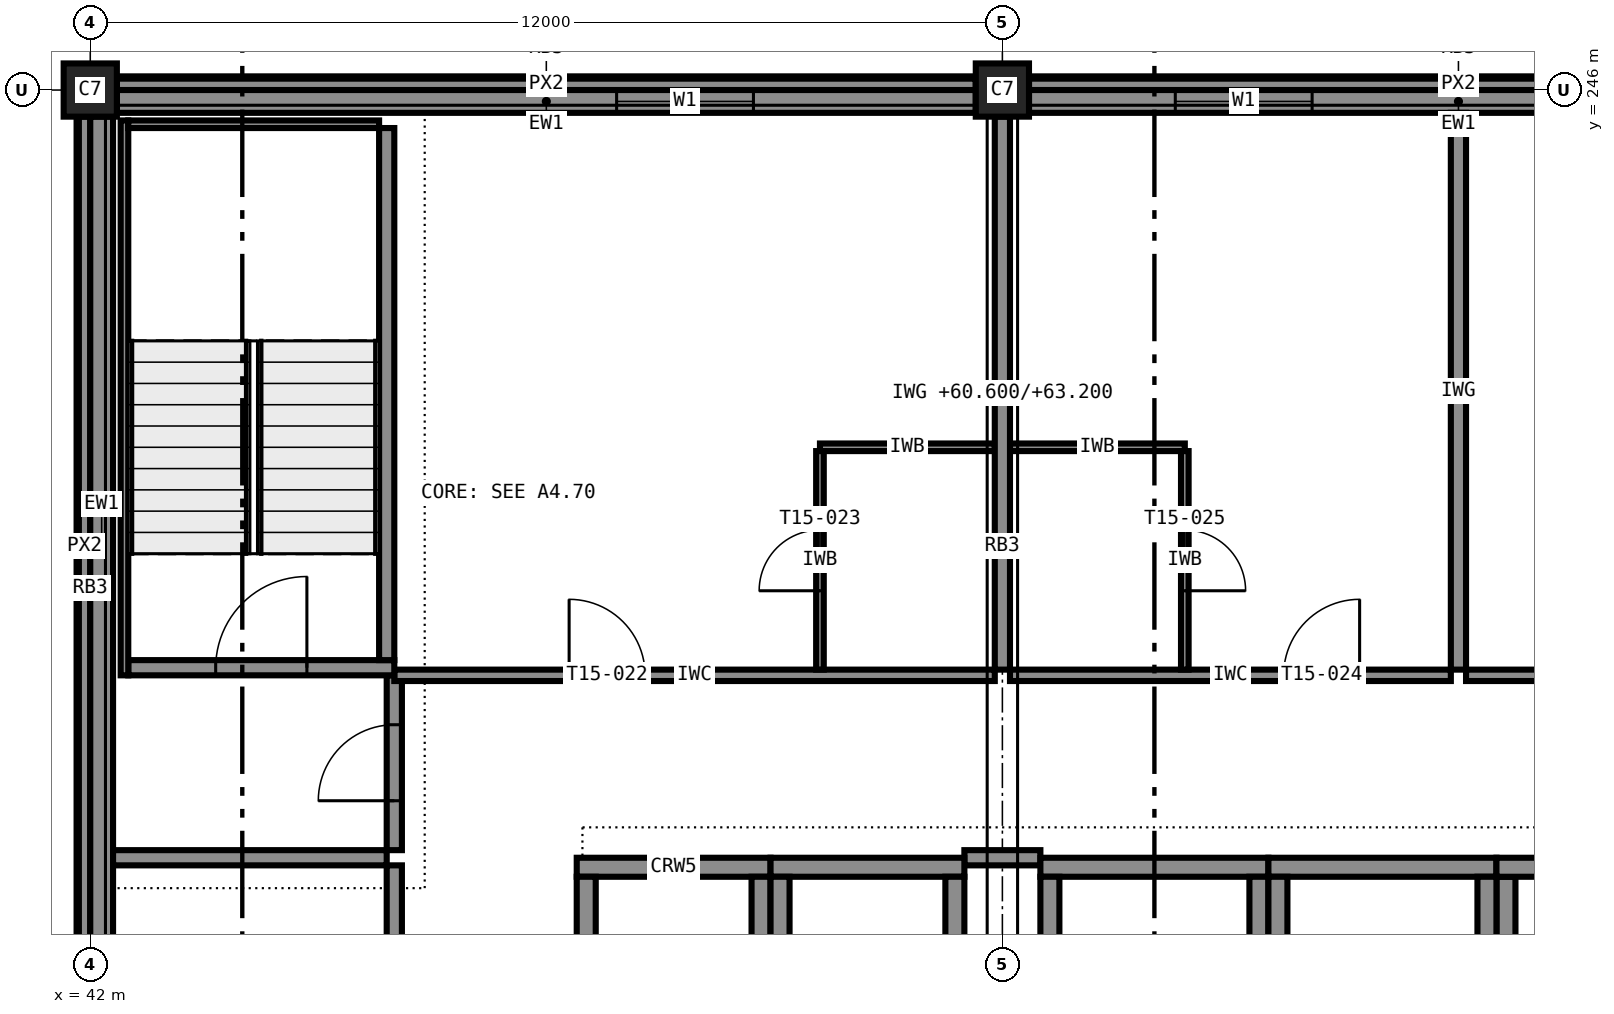
"""IFC4 building model, lengths in metres.
Left out: names, types, materials, properties, quantities, classifications, styles, units other than length and angle.
Written with IfcOpenShell. Run it as: python <this file> out.ifc"""

import sys

from ifc_helpers import new_model, si_unit, direction, frame, frame_2d, origin, origin_2d, place, context, subcontext, project, spatial, rectangle, extrude, element, fill, save


model = new_model("IFC4")
c1 = context("Model", 3, precision=1e-05, world=origin(), true_north=direction((0.0, 1.0)))
c2 = subcontext(c1, "Body", "Model", "MODEL_VIEW")
j1 = project(units=[si_unit("LENGTHUNIT", "METRE"), si_unit("PLANEANGLEUNIT", "RADIAN")], contexts=[c1])
p1 = place(None, origin())
s1 = spatial("IfcSite", under=j1, at=p1, CompositionType="ELEMENT")
p2 = place(p1, origin())
s2 = spatial("IfcBuilding", under=s1, at=p2, CompositionType="ELEMENT")
p3 = place(p2, frame((0.0, 0.0, 60.6)))
s3 = spatial("IfcBuildingStorey", under=s2, at=p3, CompositionType="ELEMENT", Elevation=60.6)
for number, where, z_axis, x_axis in (
    (1, (42.0, 246.0, 0.0), (0.0, 0.0, 1.0), (1.0, 0.0, 0.0)),
    (2, (54.0, 246.0, 0.0), (0.0, 0.0, 1.0), (1.0, 0.0, 0.0)),
):
    element("IfcColumn", number, at=place(p3, frame(where, z_axis=z_axis, x_axis=x_axis)), inside=s3, PredefinedType="COLUMN", context=c2, shape_type="SweptSolid", body=[
        extrude(rectangle(XDim=0.7, YDim=0.7, at=origin_2d()), origin(), (0.0, 0.0, 1.0), 3.6),
    ])
p4 = place(p3, frame((54.5, 235.775, 0.0), z_axis=(0.0, 0.0, 1.0), x_axis=(1.0, 0.0, 0.0)))
e3 = element("IfcWall", 3, at=p4, inside=s3, PredefinedType="SHEAR", context=c2, shape_type="SweptSolid", body=[
    extrude(rectangle(XDim=3.0, YDim=0.25, at=frame_2d((1.5, 0.0))), origin(), (0.0, 0.0, 1.0), 3.6),
])
for number, where, z_axis, x_axis in (
    (4, (54.625, 232.35, 0.0), (0.0, 0.0, 1.0), (0.0, 1.0, 0.0)),
    (5, (57.375, 232.35, 0.0), (0.0, 0.0, 1.0), (0.0, 1.0, 0.0)),
):
    element("IfcWall", number, at=place(p3, frame(where, z_axis=z_axis, x_axis=x_axis)), inside=s3, PredefinedType="SHEAR", context=c2, shape_type="SweptSolid", body=[
        extrude(rectangle(XDim=3.3, YDim=0.25, at=frame_2d((1.65, 0.0))), origin(), (0.0, 0.0, 1.0), 3.6),
    ])
p5 = place(p3, frame((57.5, 235.775, 0.0), z_axis=(0.0, 0.0, 1.0), x_axis=(1.0, 0.0, 0.0)))
e6 = element("IfcWall", 6, at=p5, inside=s3, PredefinedType="SHEAR", context=c2, shape_type="SweptSolid", body=[
    extrude(rectangle(XDim=3.0, YDim=0.25, at=frame_2d((1.5, 0.0))), origin(), (0.0, 0.0, 1.0), 3.6),
])
for number, where, z_axis, x_axis in (
    (7, (57.625, 232.35, 0.0), (0.0, 0.0, 1.0), (0.0, 1.0, 0.0)),
    (8, (60.375, 232.35, 0.0), (0.0, 0.0, 1.0), (0.0, 1.0, 0.0)),
):
    element("IfcWall", number, at=place(p3, frame(where, z_axis=z_axis, x_axis=x_axis)), inside=s3, PredefinedType="SHEAR", context=c2, shape_type="SweptSolid", body=[
        extrude(rectangle(XDim=3.3, YDim=0.25, at=frame_2d((1.65, 0.0))), origin(), (0.0, 0.0, 1.0), 3.6),
    ])
p6 = place(p3, frame((60.5, 235.775, 0.0), z_axis=(0.0, 0.0, 1.0), x_axis=(1.0, 0.0, 0.0)))
e9 = element("IfcWall", 9, at=p6, inside=s3, PredefinedType="SHEAR", context=c2, shape_type="SweptSolid", body=[
    extrude(rectangle(XDim=3.0, YDim=0.25, at=frame_2d((1.5, 0.0))), origin(), (0.0, 0.0, 1.0), 3.6),
])
p7 = place(p3, frame((60.625, 232.35, 0.0), z_axis=(0.0, 0.0, 1.0), x_axis=(0.0, 1.0, 0.0)))
e10 = element("IfcWall", 10, at=p7, inside=s3, PredefinedType="SHEAR", context=c2, shape_type="SweptSolid", body=[
    extrude(rectangle(XDim=3.3, YDim=0.25, at=frame_2d((1.65, 0.0))), origin(), (0.0, 0.0, 1.0), 3.6),
])
p8 = place(p3, frame((48.4, 235.775, 0.0), z_axis=(0.0, 0.0, 1.0), x_axis=(1.0, 0.0, 0.0)))
e11 = element("IfcWall", 11, at=p8, inside=s3, PredefinedType="SHEAR", context=c2, shape_type="SweptSolid", body=[
    extrude(rectangle(XDim=2.55, YDim=0.25, at=frame_2d((1.275, 0.0))), origin(), (0.0, 0.0, 1.0), 3.6),
])
for number, where, z_axis, x_axis in (
    (12, (48.525, 232.35, 0.0), (0.0, 0.0, 1.0), (0.0, 1.0, 0.0)),
    (13, (50.825, 232.35, 0.0), (0.0, 0.0, 1.0), (0.0, 1.0, 0.0)),
):
    element("IfcWall", number, at=place(p3, frame(where, z_axis=z_axis, x_axis=x_axis)), inside=s3, PredefinedType="SHEAR", context=c2, shape_type="SweptSolid", body=[
        extrude(rectangle(XDim=3.3, YDim=0.25, at=frame_2d((1.65, 0.0))), origin(), (0.0, 0.0, 1.0), 3.6),
    ])
p9 = place(p3, frame((50.95, 235.775, 0.0), z_axis=(0.0, 0.0, 1.0), x_axis=(1.0, 0.0, 0.0)))
e14 = element("IfcWall", 14, at=p9, inside=s3, PredefinedType="SHEAR", context=c2, shape_type="SweptSolid", body=[
    extrude(rectangle(XDim=2.55, YDim=0.25, at=frame_2d((1.275, 0.0))), origin(), (0.0, 0.0, 1.0), 3.6),
])
for number, where, z_axis, x_axis in (
    (15, (51.075, 232.35, 0.0), (0.0, 0.0, 1.0), (0.0, 1.0, 0.0)),
    (16, (53.375, 232.35, 0.0), (0.0, 0.0, 1.0), (0.0, 1.0, 0.0)),
):
    element("IfcWall", number, at=place(p3, frame(where, z_axis=z_axis, x_axis=x_axis)), inside=s3, PredefinedType="SHEAR", context=c2, shape_type="SweptSolid", body=[
        extrude(rectangle(XDim=3.3, YDim=0.25, at=frame_2d((1.65, 0.0))), origin(), (0.0, 0.0, 1.0), 3.6),
    ])
p10 = place(p3, frame((42.5, 238.4, 0.0), z_axis=(0.0, 0.0, 1.0), x_axis=(1.0, 0.0, 0.0)))
e17 = element("IfcWall", 17, at=p10, inside=s3, PredefinedType="SHEAR", context=c2, shape_type="SweptSolid", body=[
    extrude(rectangle(XDim=3.5, YDim=0.2, at=frame_2d((1.75, 0.0))), origin(), (0.0, 0.0, 1.0), 3.6),
])
p11 = place(p10, frame((1.15, 0.0, 0.0)))
e18 = element("IfcOpeningElement", 18, at=p11, cuts=e17, PredefinedType="OPENING", context=c2, shape_type="SweptSolid", body=[
    extrude(rectangle(XDim=1.2, YDim=2.1, at=frame_2d((0.6, 1.05))), frame((0.0, 0.11, 0.0), z_axis=(0.0, -1.0, 0.0), x_axis=(1.0, 0.0, 0.0)), (0.0, 0.0, 1.0), 0.22),
])
p12 = place(p3, frame((45.9, 238.5, 0.0), z_axis=(0.0, 0.0, 1.0), x_axis=(0.0, 1.0, 0.0)))
e19 = element("IfcWall", 19, at=p12, inside=s3, PredefinedType="SHEAR", context=c2, shape_type="SweptSolid", body=[
    extrude(rectangle(XDim=7.0, YDim=0.2, at=frame_2d((3.5, 0.0))), origin(), (0.0, 0.0, 1.0), 3.6),
])
p13 = place(p3, frame((42.45, 238.3, 0.0), z_axis=(0.0, 0.0, 1.0), x_axis=(0.0, 1.0, 0.0)))
e20 = element("IfcWall", 20, at=p13, inside=s3, PredefinedType="SHEAR", context=c2, shape_type="SweptSolid", body=[
    extrude(rectangle(XDim=7.3, YDim=0.1, at=frame_2d((3.65, 0.0))), origin(), (0.0, 0.0, 1.0), 3.4),
])
p14 = place(p3, frame((42.5, 245.55, 0.0), z_axis=(0.0, 0.0, 1.0), x_axis=(1.0, 0.0, 0.0)))
e21 = element("IfcWall", 21, at=p14, inside=s3, PredefinedType="SHEAR", context=c2, shape_type="SweptSolid", body=[
    extrude(rectangle(XDim=3.3, YDim=0.1, at=frame_2d((1.65, 0.0))), origin(), (0.0, 0.0, 1.0), 3.4),
])
p15 = place(p3, frame((65.65, 245.85, 0.0), z_axis=(0.0, 0.0, 1.0), x_axis=(-1.0, 0.0, 0.0)))
e22 = element("IfcWall", 22, at=p15, inside=s3, PredefinedType="STANDARD", context=c2, shape_type="SweptSolid", body=[
    extrude(rectangle(XDim=11.3, YDim=0.3, at=frame_2d((5.65, 0.0))), origin(), (0.0, 0.0, 1.0), 2.6),
])
p16 = place(p15, frame((7.575, 0.0, 0.85)))
e23 = element("IfcOpeningElement", 23, at=p16, cuts=e22, PredefinedType="OPENING", context=c2, shape_type="SweptSolid", body=[
    extrude(rectangle(XDim=1.8, YDim=1.75, at=frame_2d((0.9, 0.875))), frame((0.0, 0.16, 0.0), z_axis=(0.0, -1.0, 0.0), x_axis=(1.0, 0.0, 0.0)), (0.0, 0.0, 1.0), 0.32),
])
p17 = place(p15, frame((1.925, 0.0, 0.85)))
e24 = element("IfcOpeningElement", 24, at=p17, cuts=e22, PredefinedType="OPENING", context=c2, shape_type="SweptSolid", body=[
    extrude(rectangle(XDim=1.8, YDim=1.75, at=frame_2d((0.9, 0.875))), frame((0.0, 0.16, 0.0), z_axis=(0.0, -1.0, 0.0), x_axis=(1.0, 0.0, 0.0)), (0.0, 0.0, 1.0), 0.32),
])
p18 = place(p3, frame((53.65, 245.85, 0.0), z_axis=(0.0, 0.0, 1.0), x_axis=(-1.0, 0.0, 0.0)))
e25 = element("IfcWall", 25, at=p18, inside=s3, PredefinedType="STANDARD", context=c2, shape_type="SweptSolid", body=[
    extrude(rectangle(XDim=11.3, YDim=0.3, at=frame_2d((5.65, 0.0))), origin(), (0.0, 0.0, 1.0), 2.6),
])
p19 = place(p18, frame((2.925, 0.0, 0.85)))
e26 = element("IfcOpeningElement", 26, at=p19, cuts=e25, PredefinedType="OPENING", context=c2, shape_type="SweptSolid", body=[
    extrude(rectangle(XDim=1.8, YDim=1.75, at=frame_2d((0.9, 0.875))), frame((0.0, 0.16, 0.0), z_axis=(0.0, -1.0, 0.0), x_axis=(1.0, 0.0, 0.0)), (0.0, 0.0, 1.0), 0.32),
])
for number, where, z_axis, x_axis in (
    (27, (65.65, 246.075, 3.4), (0.0, 0.0, 1.0), (-1.0, 0.0, 0.0)),
    (28, (53.65, 246.075, 3.4), (0.0, 0.0, 1.0), (-1.0, 0.0, 0.0)),
):
    element("IfcWall", number, at=place(p3, frame(where, z_axis=z_axis, x_axis=x_axis)), inside=s3, PredefinedType="STANDARD", context=c2, shape_type="SweptSolid", body=[
        extrude(rectangle(XDim=11.3, YDim=0.15, at=frame_2d((5.65, 0.0))), origin(), (0.0, 0.0, 1.0), 0.2),
    ])
p20 = place(p3, frame((42.15, 245.65, 0.0), z_axis=(0.0, 0.0, 1.0), x_axis=(0.0, -1.0, 0.0)))
e29 = element("IfcWall", 29, at=p20, inside=s3, PredefinedType="STANDARD", context=c2, shape_type="SweptSolid", body=[
    extrude(rectangle(XDim=11.3, YDim=0.3, at=frame_2d((5.65, 0.0))), origin(), (0.0, 0.0, 1.0), 2.6),
])
p21 = place(p3, frame((41.925, 245.65, 3.4), z_axis=(0.0, 0.0, 1.0), x_axis=(0.0, -1.0, 0.0)))
e30 = element("IfcWall", 30, at=p21, inside=s3, PredefinedType="STANDARD", context=c2, shape_type="SweptSolid", body=[
    extrude(rectangle(XDim=11.3, YDim=0.15, at=frame_2d((5.65, 0.0))), origin(), (0.0, 0.0, 1.0), 0.2),
])
p22 = place(p3, frame((42.3, 235.9, 0.0), z_axis=(0.0, 0.0, 1.0), x_axis=(1.0, 0.0, 0.0)))
e31 = element("IfcWall", 31, at=p22, inside=s3, PredefinedType="PARTITIONING", context=c2, shape_type="SweptSolid", body=[
    extrude(rectangle(XDim=3.6, YDim=0.2, at=frame_2d((1.8, 0.0))), origin(), (0.0, 0.0, 1.0), 3.4),
])
p23 = place(p3, frame((53.5, 235.9, 0.0), z_axis=(0.0, 0.0, 1.0), x_axis=(1.0, 0.0, 0.0)))
e32 = element("IfcWall", 32, at=p23, inside=s3, PredefinedType="PARTITIONING", context=c2, shape_type="SweptSolid", body=[
    extrude(rectangle(XDim=1.0, YDim=0.2, at=frame_2d((0.5, 0.0))), origin(), (0.0, 0.0, 1.0), 3.4),
])
p24 = place(p3, frame((46.0, 232.2, 0.0), z_axis=(0.0, 0.0, 1.0), x_axis=(0.0, 1.0, 0.0)))
e33 = element("IfcWall", 33, at=p24, inside=s3, PredefinedType="PARTITIONING", context=c2, shape_type="SweptSolid", body=[
    extrude(rectangle(XDim=3.6, YDim=0.2, at=frame_2d((1.8, 0.0))), origin(), (0.0, 0.0, 1.0), 3.4),
])
p25 = place(p24, frame((1.35, 0.0, 0.0)))
e34 = element("IfcOpeningElement", 34, at=p25, cuts=e33, PredefinedType="OPENING", context=c2, shape_type="SweptSolid", body=[
    extrude(rectangle(XDim=0.9, YDim=2.1, at=frame_2d((0.45, 1.05))), frame((0.0, 0.11, 0.0), z_axis=(0.0, -1.0, 0.0), x_axis=(1.0, 0.0, 0.0)), (0.0, 0.0, 1.0), 0.22),
])
p26 = place(p3, frame((46.0, 236.0, 0.0), z_axis=(0.0, 0.0, 1.0), x_axis=(0.0, 1.0, 0.0)))
e35 = element("IfcWall", 35, at=p26, inside=s3, PredefinedType="PARTITIONING", context=c2, shape_type="SweptSolid", body=[
    extrude(rectangle(XDim=2.3, YDim=0.2, at=frame_2d((1.15, 0.0))), origin(), (0.0, 0.0, 1.0), 3.4),
])
p27 = place(p26, frame((0.65, 0.0, 0.0)))
e36 = element("IfcOpeningElement", 36, at=p27, cuts=e35, PredefinedType="OPENING", context=c2, shape_type="SweptSolid", body=[
    extrude(rectangle(XDim=1.0, YDim=2.1, at=frame_2d((0.5, 1.05))), frame((0.0, 0.11, 0.0), z_axis=(0.0, -1.0, 0.0), x_axis=(1.0, 0.0, 0.0)), (0.0, 0.0, 1.0), 0.22),
])
p28 = place(p3, frame((46.0, 238.3, 0.0), z_axis=(0.0, 0.0, 1.0), x_axis=(1.0, 0.0, 0.0)))
e37 = element("IfcWall", 37, at=p28, inside=s3, PredefinedType="PARTITIONING", context=c2, shape_type="SweptSolid", body=[
    extrude(rectangle(XDim=7.9, YDim=0.15, at=frame_2d((3.95, 0.0))), origin(), (0.0, 0.0, 1.0), 3.4),
])
p29 = place(p28, frame((2.3, 0.0, 0.0)))
e38 = element("IfcOpeningElement", 38, at=p29, cuts=e37, PredefinedType="OPENING", context=c2, shape_type="SweptSolid", body=[
    extrude(rectangle(XDim=1.0, YDim=2.1, at=frame_2d((0.5, 1.05))), frame((0.0, 0.085, 0.0), z_axis=(0.0, -1.0, 0.0), x_axis=(1.0, 0.0, 0.0)), (0.0, 0.0, 1.0), 0.17),
])
p30 = place(p3, frame((51.6, 241.3, 0.0), z_axis=(0.0, 0.0, 1.0), x_axis=(1.0, 0.0, 0.0)))
e39 = element("IfcWall", 39, at=p30, inside=s3, PredefinedType="PARTITIONING", context=c2, shape_type="SweptSolid", body=[
    extrude(rectangle(XDim=2.3, YDim=0.1, at=frame_2d((1.15, 0.0))), origin(), (0.0, 0.0, 1.0), 3.4),
])
p31 = place(p3, frame((51.6, 238.375, 0.0), z_axis=(0.0, 0.0, 1.0), x_axis=(0.0, 1.0, 0.0)))
e40 = element("IfcWall", 40, at=p31, inside=s3, PredefinedType="PARTITIONING", context=c2, shape_type="SweptSolid", body=[
    extrude(rectangle(XDim=2.875, YDim=0.1, at=frame_2d((1.438, 0.0))), origin(), (0.0, 0.0, 1.0), 3.4),
])
p32 = place(p31, frame((1.038, 0.0, 0.0)))
e41 = element("IfcOpeningElement", 41, at=p32, cuts=e40, PredefinedType="OPENING", context=c2, shape_type="SweptSolid", body=[
    extrude(rectangle(XDim=0.8, YDim=2.1, at=frame_2d((0.4, 1.05))), frame((0.0, 0.06, 0.0), z_axis=(0.0, -1.0, 0.0), x_axis=(1.0, 0.0, 0.0)), (0.0, 0.0, 1.0), 0.12),
])
p33 = place(p3, frame((54.1, 238.3, 0.0), z_axis=(0.0, 0.0, 1.0), x_axis=(1.0, 0.0, 0.0)))
e42 = element("IfcWall", 42, at=p33, inside=s3, PredefinedType="PARTITIONING", context=c2, shape_type="SweptSolid", body=[
    extrude(rectangle(XDim=5.8, YDim=0.15, at=frame_2d((2.9, 0.0))), origin(), (0.0, 0.0, 1.0), 3.4),
])
p34 = place(p33, frame((3.6, 0.0, 0.0)))
e43 = element("IfcOpeningElement", 43, at=p34, cuts=e42, PredefinedType="OPENING", context=c2, shape_type="SweptSolid", body=[
    extrude(rectangle(XDim=1.0, YDim=2.1, at=frame_2d((0.5, 1.05))), frame((0.0, 0.085, 0.0), z_axis=(0.0, -1.0, 0.0), x_axis=(1.0, 0.0, 0.0)), (0.0, 0.0, 1.0), 0.17),
])
p35 = place(p3, frame((54.1, 241.3, 0.0), z_axis=(0.0, 0.0, 1.0), x_axis=(1.0, 0.0, 0.0)))
e44 = element("IfcWall", 44, at=p35, inside=s3, PredefinedType="PARTITIONING", context=c2, shape_type="SweptSolid", body=[
    extrude(rectangle(XDim=2.3, YDim=0.1, at=frame_2d((1.15, 0.0))), origin(), (0.0, 0.0, 1.0), 3.4),
])
p36 = place(p3, frame((56.4, 241.25, 0.0), z_axis=(0.0, 0.0, 1.0), x_axis=(0.0, -1.0, 0.0)))
e45 = element("IfcWall", 45, at=p36, inside=s3, PredefinedType="PARTITIONING", context=c2, shape_type="SweptSolid", body=[
    extrude(rectangle(XDim=2.875, YDim=0.1, at=frame_2d((1.438, 0.0))), origin(), (0.0, 0.0, 1.0), 3.4),
])
p37 = place(p36, frame((1.038, 0.0, 0.0)))
e46 = element("IfcOpeningElement", 46, at=p37, cuts=e45, PredefinedType="OPENING", context=c2, shape_type="SweptSolid", body=[
    extrude(rectangle(XDim=0.8, YDim=2.1, at=frame_2d((0.4, 1.05))), frame((0.0, 0.06, 0.0), z_axis=(0.0, -1.0, 0.0), x_axis=(1.0, 0.0, 0.0)), (0.0, 0.0, 1.0), 0.12),
])
p38 = place(p3, frame((60.1, 238.3, 0.0), z_axis=(0.0, 0.0, 1.0), x_axis=(1.0, 0.0, 0.0)))
e47 = element("IfcWall", 47, at=p38, inside=s3, PredefinedType="PARTITIONING", context=c2, shape_type="SweptSolid", body=[
    extrude(rectangle(XDim=5.8, YDim=0.15, at=frame_2d((2.9, 0.0))), origin(), (0.0, 0.0, 1.0), 3.4),
])
p39 = place(p38, frame((1.2, 0.0, 0.0)))
e48 = element("IfcOpeningElement", 48, at=p39, cuts=e47, PredefinedType="OPENING", context=c2, shape_type="SweptSolid", body=[
    extrude(rectangle(XDim=1.0, YDim=2.1, at=frame_2d((0.5, 1.05))), frame((0.0, 0.085, 0.0), z_axis=(0.0, -1.0, 0.0), x_axis=(1.0, 0.0, 0.0)), (0.0, 0.0, 1.0), 0.17),
])
p40 = place(p3, frame((54.0, 245.65, 0.0), z_axis=(0.0, 0.0, 1.0), x_axis=(0.0, -1.0, 0.0)))
e49 = element("IfcWall", 49, at=p40, inside=s3, PredefinedType="PARTITIONING", context=c2, shape_type="SweptSolid", body=[
    extrude(rectangle(XDim=7.275, YDim=0.2, at=frame_2d((3.637, 0.0))), origin(), (0.0, 0.0, 1.0), 2.6),
])
p41 = place(p3, frame((60.0, 245.7, 0.0), z_axis=(0.0, 0.0, 1.0), x_axis=(0.0, -1.0, 0.0)))
e50 = element("IfcWall", 50, at=p41, inside=s3, PredefinedType="PARTITIONING", context=c2, shape_type="SweptSolid", body=[
    extrude(rectangle(XDim=7.325, YDim=0.2, at=frame_2d((3.663, 0.0))), origin(), (0.0, 0.0, 1.0), 3.4),
])
p42 = place(p16, origin())
e51 = element("IfcWindow", 51, at=p42, inside=s3, PartitioningType="SINGLE_PANEL", PredefinedType="WINDOW", context=c2, shape_type="SweptSolid", body=[
    extrude(rectangle(XDim=1.8, YDim=1.75, at=frame_2d((0.9, 0.875))), frame((0.0, 0.03, 0.0), z_axis=(0.0, -1.0, 0.0), x_axis=(1.0, 0.0, 0.0)), (0.0, 0.0, 1.0), 0.06),
])
fill(e23, e51)
p43 = place(p19, origin())
e52 = element("IfcWindow", 52, at=p43, inside=s3, PartitioningType="SINGLE_PANEL", PredefinedType="WINDOW", context=c2, shape_type="SweptSolid", body=[
    extrude(rectangle(XDim=1.8, YDim=1.75, at=frame_2d((0.9, 0.875))), frame((0.0, 0.03, 0.0), z_axis=(0.0, -1.0, 0.0), x_axis=(1.0, 0.0, 0.0)), (0.0, 0.0, 1.0), 0.06),
])
fill(e26, e52)
p44 = place(p27, origin())
e53 = element("IfcDoor", 53, at=p44, inside=s3, OperationType="SINGLE_SWING_LEFT", PredefinedType="DOOR", context=c2, shape_type="SweptSolid", body=[
    extrude(rectangle(XDim=1.0, YDim=2.1, at=frame_2d((0.5, 1.05))), frame((0.0, 0.025, 0.0), z_axis=(0.0, -1.0, 0.0), x_axis=(1.0, 0.0, 0.0)), (0.0, 0.0, 1.0), 0.05),
])
fill(e36, e53)
p45 = place(p29, origin())
e54 = element("IfcDoor", 54, at=p45, inside=s3, OperationType="SINGLE_SWING_LEFT", PredefinedType="DOOR", context=c2, shape_type="SweptSolid", body=[
    extrude(rectangle(XDim=1.0, YDim=2.1, at=frame_2d((0.5, 1.05))), frame((0.0, 0.025, 0.0), z_axis=(0.0, -1.0, 0.0), x_axis=(1.0, 0.0, 0.0)), (0.0, 0.0, 1.0), 0.05),
])
fill(e38, e54)
p46 = place(p32, origin())
e55 = element("IfcDoor", 55, at=p46, inside=s3, OperationType="SINGLE_SWING_LEFT", PredefinedType="DOOR", context=c2, shape_type="SweptSolid", body=[
    extrude(rectangle(XDim=0.8, YDim=2.1, at=frame_2d((0.4, 1.05))), frame((0.0, 0.025, 0.0), z_axis=(0.0, -1.0, 0.0), x_axis=(1.0, 0.0, 0.0)), (0.0, 0.0, 1.0), 0.05),
])
fill(e41, e55)
p47 = place(p34, origin())
e56 = element("IfcDoor", 56, at=p47, inside=s3, OperationType="SINGLE_SWING_RIGHT", PredefinedType="DOOR", context=c2, shape_type="SweptSolid", body=[
    extrude(rectangle(XDim=1.0, YDim=2.1, at=frame_2d((0.5, 1.05))), frame((0.0, 0.025, 0.0), z_axis=(0.0, -1.0, 0.0), x_axis=(1.0, 0.0, 0.0)), (0.0, 0.0, 1.0), 0.05),
])
fill(e43, e56)
p48 = place(p37, origin())
e57 = element("IfcDoor", 57, at=p48, inside=s3, OperationType="SINGLE_SWING_RIGHT", PredefinedType="DOOR", context=c2, shape_type="SweptSolid", body=[
    extrude(rectangle(XDim=0.8, YDim=2.1, at=frame_2d((0.4, 1.05))), frame((0.0, 0.025, 0.0), z_axis=(0.0, -1.0, 0.0), x_axis=(1.0, 0.0, 0.0)), (0.0, 0.0, 1.0), 0.05),
])
fill(e46, e57)
p49 = place(p11, origin())
e58 = element("IfcDoor", 58, at=p49, inside=s3, OperationType="SINGLE_SWING_RIGHT", PredefinedType="DOOR", context=c2, shape_type="SweptSolid", body=[
    extrude(rectangle(XDim=1.2, YDim=2.1, at=frame_2d((0.6, 1.05))), frame((0.0, 0.025, 0.0), z_axis=(0.0, -1.0, 0.0), x_axis=(1.0, 0.0, 0.0)), (0.0, 0.0, 1.0), 0.05),
])
fill(e18, e58)
save(model, sys.argv[1])
